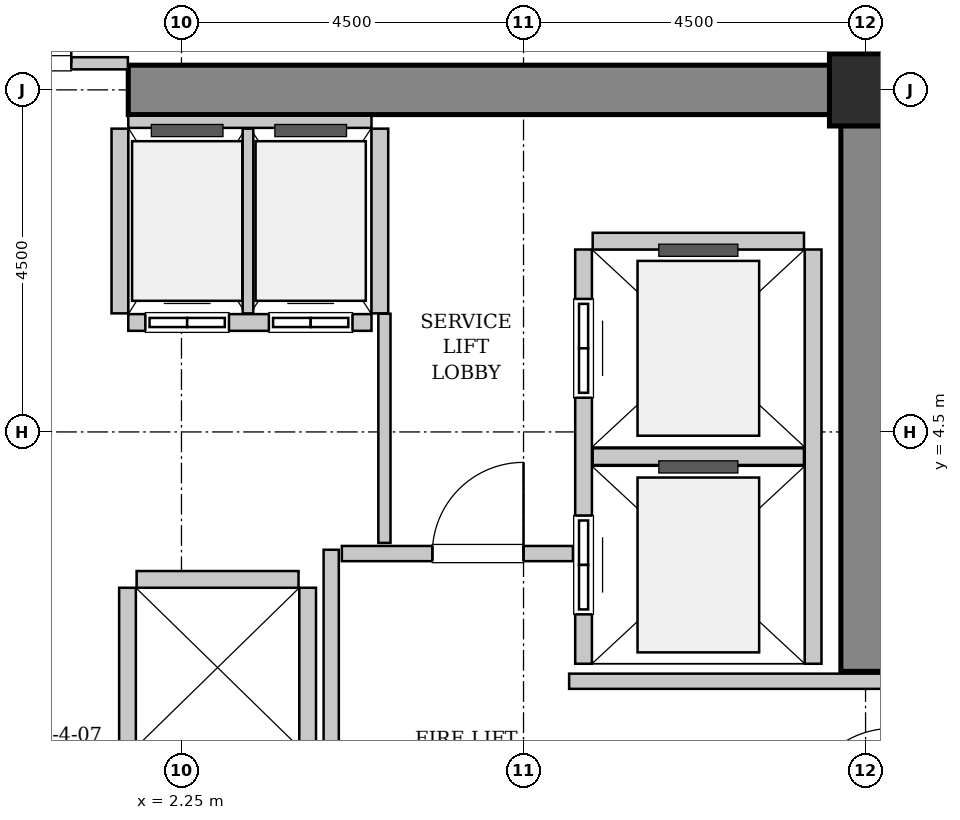
"""IFC4 building model, lengths in metres.
Left out: names, types, materials, properties, quantities, classifications, styles, units other than length and angle.
Written with IfcOpenShell. Run it as: python <this file> out.ifc"""

import sys

from ifc_helpers import new_model, si_unit, direction, frame, frame_2d, origin, origin_2d, place, context, subcontext, project, spatial, rectangle, hollow_rectangle, extrude, source, transform, mapped, element, fill, save


model = new_model("IFC4")
c1 = context("Model", 3, precision=1e-05, world=origin(), true_north=direction((0.0, 1.0)))
c2 = subcontext(c1, "Body", "Model", "MODEL_VIEW")
j1 = project(units=[si_unit("LENGTHUNIT", "METRE"), si_unit("PLANEANGLEUNIT", "RADIAN")], contexts=[c1])
p1 = place(None, origin())
s1 = spatial("IfcSite", under=j1, at=p1, CompositionType="ELEMENT")
p2 = place(p1, origin())
s2 = spatial("IfcBuilding", under=s1, at=p2, CompositionType="ELEMENT")
p3 = place(p2, frame((0.0, 0.0, 44.4)))
s3 = spatial("IfcBuildingStorey", under=s2, at=p3, CompositionType="ELEMENT", Elevation=44.4)
m1 = source(origin(), c2, "Body", "SweptSolid", [
    extrude(rectangle(XDim=10.025, YDim=0.65, at=frame_2d((5.012, 0.0))), origin(), (0.0, 0.0, 1.0), 3.8),
])
p4 = place(p3, frame((1.55, 9.0, 0.0), z_axis=(0.0, 0.0, 1.0), x_axis=(1.0, 0.0, 0.0)))
e1 = element("IfcWall", 1, at=p4, inside=s3, PredefinedType="SHEAR", context=c2, shape_type="MappedRepresentation", body=[
    mapped(m1, transform((0.0, 0.0, 0.0), x_axis=(1.0, 0.0, 0.0), y_axis=(0.0, 1.0, 0.0), z_axis=(0.0, 0.0, 1.0), scale=1.0)),
])
m2 = source(origin(), c2, "Body", "SweptSolid", [
    extrude(rectangle(XDim=7.325, YDim=0.65, at=frame_2d((3.663, 0.0))), origin(), (0.0, 0.0, 1.0), 3.8),
])
p5 = place(p3, frame((11.25, 1.35, 0.0), z_axis=(0.0, 0.0, 1.0), x_axis=(0.0, 1.0, 0.0)))
e2 = element("IfcWall", 2, at=p5, inside=s3, PredefinedType="SHEAR", context=c2, shape_type="MappedRepresentation", body=[
    mapped(m2, transform((0.0, 0.0, 0.0), x_axis=(1.0, 0.0, 0.0), y_axis=(0.0, 1.0, 0.0), z_axis=(0.0, 0.0, 1.0), scale=1.0)),
])
m3 = source(origin(), c2, "Body", "SweptSolid", [
    extrude(hollow_rectangle(XDim=0.95, YDim=0.95, WallThickness=0.045, InnerFilletRadius=0.045, OuterFilletRadius=0.09, at=origin_2d()), origin(), (0.0, 0.0, 1.0), 3.8),
])
p6 = place(p3, frame((11.25, 9.0, 0.0), z_axis=(0.0, 0.0, 1.0), x_axis=(1.0, 0.0, 0.0)))
e3 = element("IfcColumn", 3, at=p6, inside=s3, PredefinedType="COLUMN", context=c2, shape_type="MappedRepresentation", body=[
    mapped(m3, transform((0.0, 0.0, 0.0), x_axis=(1.0, 0.0, 0.0), y_axis=(0.0, 1.0, 0.0), z_axis=(0.0, 0.0, 1.0), scale=1.0)),
])
m4 = source(origin(), c2, "Body", "SweptSolid", [
    extrude(rectangle(XDim=5.45, YDim=0.22, at=frame_2d((2.725, 0.0))), origin(), (0.0, 0.0, 1.0), 3.535),
])
p7 = place(p3, frame((7.54, 6.9, 0.0), z_axis=(0.0, 0.0, 1.0), x_axis=(0.0, -1.0, 0.0)))
e4 = element("IfcWall", 4, at=p7, inside=s3, PredefinedType="SOLIDWALL", context=c2, shape_type="MappedRepresentation", body=[
    mapped(m4, transform((0.0, 0.0, 0.0), x_axis=(1.0, 0.0, 0.0), y_axis=(0.0, 1.0, 0.0), z_axis=(0.0, 0.0, 1.0), scale=1.0)),
])
p8 = place(p7, frame((3.5, 0.0, 0.0)))
e5 = element("IfcOpeningElement", 5, at=p8, cuts=e4, PredefinedType="OPENING", context=c2, shape_type="SweptSolid", body=[
    extrude(rectangle(XDim=1.3, YDim=2.3, at=frame_2d((0.65, 1.15))), frame((0.0, 0.12, 0.0), z_axis=(0.0, -1.0, 0.0), x_axis=(1.0, 0.0, 0.0)), (0.0, 0.0, 1.0), 0.24),
])
p9 = place(p7, frame((0.65, 0.0, 0.0)))
e6 = element("IfcOpeningElement", 6, at=p9, cuts=e4, PredefinedType="OPENING", context=c2, shape_type="SweptSolid", body=[
    extrude(rectangle(XDim=1.3, YDim=2.3, at=frame_2d((0.65, 1.15))), frame((0.0, 0.12, 0.0), z_axis=(0.0, -1.0, 0.0), x_axis=(1.0, 0.0, 0.0)), (0.0, 0.0, 1.0), 0.24),
])
p10 = place(p3, frame((10.56, 1.45, 0.0), z_axis=(0.0, 0.0, 1.0), x_axis=(0.0, 1.0, 0.0)))
e7 = element("IfcWall", 7, at=p10, inside=s3, PredefinedType="SOLIDWALL", context=c2, shape_type="MappedRepresentation", body=[
    mapped(m4, transform((0.0, 0.0, 0.0), x_axis=(1.0, 0.0, 0.0), y_axis=(0.0, 1.0, 0.0), z_axis=(0.0, 0.0, 1.0), scale=1.0)),
])
m5 = source(origin(), c2, "Body", "SweptSolid", [
    extrude(rectangle(XDim=2.78, YDim=0.22, at=frame_2d((1.39, 0.0))), origin(), (0.0, 0.0, 1.0), 3.535),
])
for number, where, z_axis, x_axis in (
    (8, (7.66, 4.175, 0.0), (0.0, 0.0, 1.0), (1.0, 0.0, 0.0)),
    (9, (10.44, 7.01, 0.0), (0.0, 0.0, 1.0), (-1.0, 0.0, 0.0)),
):
    element("IfcWall", number, at=place(p3, frame(where, z_axis=z_axis, x_axis=x_axis)), inside=s3, PredefinedType="SOLIDWALL", context=c2, shape_type="MappedRepresentation", body=[
        mapped(m5, transform((0.0, 0.0, 0.0), x_axis=(1.0, 0.0, 0.0), y_axis=(0.0, 1.0, 0.0), z_axis=(0.0, 0.0, 1.0), scale=1.0)),
    ])
m6 = source(origin(), c2, "Body", "SweptSolid", [
    extrude(rectangle(XDim=3.2, YDim=0.22, at=frame_2d((1.6, 0.0))), origin(), (0.0, 0.0, 1.0), 3.535),
])
p11 = place(p3, frame((1.55, 5.94, 0.0), z_axis=(0.0, 0.0, 1.0), x_axis=(1.0, 0.0, 0.0)))
e10 = element("IfcWall", 10, at=p11, inside=s3, PredefinedType="SOLIDWALL", context=c2, shape_type="MappedRepresentation", body=[
    mapped(m6, transform((0.0, 0.0, 0.0), x_axis=(1.0, 0.0, 0.0), y_axis=(0.0, 1.0, 0.0), z_axis=(0.0, 0.0, 1.0), scale=1.0)),
])
p12 = place(p11, frame((0.225, 0.0, 0.0)))
e11 = element("IfcOpeningElement", 11, at=p12, cuts=e10, PredefinedType="OPENING", context=c2, shape_type="SweptSolid", body=[
    extrude(rectangle(XDim=1.1, YDim=2.2, at=frame_2d((0.55, 1.1))), frame((0.0, 0.12, 0.0), z_axis=(0.0, -1.0, 0.0), x_axis=(1.0, 0.0, 0.0)), (0.0, 0.0, 1.0), 0.24),
])
p13 = place(p11, frame((1.85, 0.0, 0.0)))
e12 = element("IfcOpeningElement", 12, at=p13, cuts=e10, PredefinedType="OPENING", context=c2, shape_type="SweptSolid", body=[
    extrude(rectangle(XDim=1.1, YDim=2.2, at=frame_2d((0.55, 1.1))), frame((0.0, 0.12, 0.0), z_axis=(0.0, -1.0, 0.0), x_axis=(1.0, 0.0, 0.0)), (0.0, 0.0, 1.0), 0.24),
])
m7 = source(origin(), c2, "Body", "SweptSolid", [
    extrude(rectangle(XDim=3.2, YDim=0.16, at=frame_2d((1.6, 0.0))), origin(), (0.0, 0.0, 1.0), 2.425),
])
p14 = place(p3, frame((4.75, 8.58, 0.0), z_axis=(0.0, 0.0, 1.0), x_axis=(-1.0, 0.0, 0.0)))
e13 = element("IfcWall", 13, at=p14, inside=s3, PredefinedType="PARTITIONING", context=c2, shape_type="MappedRepresentation", body=[
    mapped(m7, transform((0.0, 0.0, 0.0), x_axis=(1.0, 0.0, 0.0), y_axis=(0.0, 1.0, 0.0), z_axis=(0.0, 0.0, 1.0), scale=1.0)),
])
m8 = source(origin(), c2, "Body", "SweptSolid", [
    extrude(rectangle(XDim=2.43, YDim=0.22, at=frame_2d((1.215, 0.0))), origin(), (0.0, 0.0, 1.0), 3.535),
])
p15 = place(p3, frame((1.44, 8.49, 0.0), z_axis=(0.0, 0.0, 1.0), x_axis=(0.0, -1.0, 0.0)))
e14 = element("IfcWall", 14, at=p15, inside=s3, PredefinedType="SOLIDWALL", context=c2, shape_type="MappedRepresentation", body=[
    mapped(m8, transform((0.0, 0.0, 0.0), x_axis=(1.0, 0.0, 0.0), y_axis=(0.0, 1.0, 0.0), z_axis=(0.0, 0.0, 1.0), scale=1.0)),
])
m9 = source(origin(), c2, "Body", "SweptSolid", [
    extrude(rectangle(XDim=2.43, YDim=0.14, at=frame_2d((1.215, 0.0))), origin(), (0.0, 0.0, 1.0), 3.535),
])
p16 = place(p3, frame((3.125, 6.06, 0.0), z_axis=(0.0, 0.0, 1.0), x_axis=(0.0, 1.0, 0.0)))
e15 = element("IfcWall", 15, at=p16, inside=s3, PredefinedType="PARTITIONING", context=c2, shape_type="MappedRepresentation", body=[
    mapped(m9, transform((0.0, 0.0, 0.0), x_axis=(1.0, 0.0, 0.0), y_axis=(0.0, 1.0, 0.0), z_axis=(0.0, 0.0, 1.0), scale=1.0)),
])
p17 = place(p3, frame((4.86, 6.06, 0.0), z_axis=(0.0, 0.0, 1.0), x_axis=(0.0, 1.0, 0.0)))
e16 = element("IfcWall", 16, at=p17, inside=s3, PredefinedType="SOLIDWALL", context=c2, shape_type="MappedRepresentation", body=[
    mapped(m8, transform((0.0, 0.0, 0.0), x_axis=(1.0, 0.0, 0.0), y_axis=(0.0, 1.0, 0.0), z_axis=(0.0, 0.0, 1.0), scale=1.0)),
])
m10 = source(origin(), c2, "Body", "SweptSolid", [
    extrude(rectangle(XDim=4.9, YDim=0.22, at=frame_2d((2.45, 0.0))), origin(), (0.0, 0.0, 1.0), 3.535),
])
for number, where, z_axis, x_axis in (
    (17, (1.54, 2.45, 0.0), (0.0, 0.0, 1.0), (0.0, -1.0, 0.0)),
    (18, (3.91, -2.45, 0.0), (0.0, 0.0, 1.0), (0.0, 1.0, 0.0)),
):
    element("IfcWall", number, at=place(p3, frame(where, z_axis=z_axis, x_axis=x_axis)), inside=s3, PredefinedType="SOLIDWALL", context=c2, shape_type="MappedRepresentation", body=[
        mapped(m10, transform((0.0, 0.0, 0.0), x_axis=(1.0, 0.0, 0.0), y_axis=(0.0, 1.0, 0.0), z_axis=(0.0, 0.0, 1.0), scale=1.0)),
    ])
m11 = source(origin(), c2, "Body", "SweptSolid", [
    extrude(rectangle(XDim=2.13, YDim=0.22, at=frame_2d((1.065, 0.0))), origin(), (0.0, 0.0, 1.0), 3.535),
])
p18 = place(p3, frame((3.79, 2.56, 0.0), z_axis=(0.0, 0.0, 1.0), x_axis=(-1.0, 0.0, 0.0)))
e19 = element("IfcWall", 19, at=p18, inside=s3, PredefinedType="SOLIDWALL", context=c2, shape_type="MappedRepresentation", body=[
    mapped(m11, transform((0.0, 0.0, 0.0), x_axis=(1.0, 0.0, 0.0), y_axis=(0.0, 1.0, 0.0), z_axis=(0.0, 0.0, 1.0), scale=1.0)),
])
m12 = source(origin(), c2, "Body", "SweptSolid", [
    extrude(rectangle(XDim=5.9, YDim=0.2, at=frame_2d((2.95, 0.0))), origin(), (0.0, 0.0, 1.0), 3.535),
])
p19 = place(p3, frame((4.22, -2.95, 0.0), z_axis=(0.0, 0.0, 1.0), x_axis=(0.0, 1.0, 0.0)))
e20 = element("IfcWall", 20, at=p19, inside=s3, PredefinedType="PARTITIONING", context=c2, shape_type="MappedRepresentation", body=[
    mapped(m12, transform((0.0, 0.0, 0.0), x_axis=(1.0, 0.0, 0.0), y_axis=(0.0, 1.0, 0.0), z_axis=(0.0, 0.0, 1.0), scale=1.0)),
])
m13 = source(origin(), c2, "Body", "SweptSolid", [
    extrude(rectangle(XDim=3.04, YDim=0.2, at=frame_2d((1.52, 0.0))), origin(), (0.0, 0.0, 1.0), 3.535),
])
p20 = place(p3, frame((4.36, 2.9, 0.0), z_axis=(0.0, 0.0, 1.0), x_axis=(1.0, 0.0, 0.0)))
e21 = element("IfcWall", 21, at=p20, inside=s3, PredefinedType="PARTITIONING", context=c2, shape_type="MappedRepresentation", body=[
    mapped(m13, transform((0.0, 0.0, 0.0), x_axis=(1.0, 0.0, 0.0), y_axis=(0.0, 1.0, 0.0), z_axis=(0.0, 0.0, 1.0), scale=1.0)),
])
p21 = place(p20, frame((1.19, 0.0, 0.0)))
e22 = element("IfcOpeningElement", 22, at=p21, cuts=e21, PredefinedType="OPENING", context=c2, shape_type="SweptSolid", body=[
    extrude(rectangle(XDim=1.2, YDim=2.15, at=frame_2d((0.6, 1.075))), frame((0.0, 0.11, 0.0), z_axis=(0.0, -1.0, 0.0), x_axis=(1.0, 0.0, 0.0)), (0.0, 0.0, 1.0), 0.22),
])
m14 = source(origin(), c2, "Body", "SweptSolid", [
    extrude(rectangle(XDim=4.11, YDim=0.2, at=frame_2d((2.055, 0.0))), origin(), (0.0, 0.0, 1.0), 3.535),
])
p22 = place(p3, frame((7.35, 1.22, 0.0), z_axis=(0.0, 0.0, 1.0), x_axis=(1.0, 0.0, 0.0)))
e23 = element("IfcWall", 23, at=p22, inside=s3, PredefinedType="PARTITIONING", context=c2, shape_type="MappedRepresentation", body=[
    mapped(m14, transform((0.0, 0.0, 0.0), x_axis=(1.0, 0.0, 0.0), y_axis=(0.0, 1.0, 0.0), z_axis=(0.0, 0.0, 1.0), scale=1.0)),
])
m15 = source(origin(), c2, "Body", "SweptSolid", [
    extrude(rectangle(XDim=3.09, YDim=0.16, at=frame_2d((1.545, 0.0))), origin(), (0.0, 0.0, 1.0), 2.425),
])
p23 = place(p3, frame((-1.545, 9.35, 0.0), z_axis=(0.0, 0.0, 1.0), x_axis=(1.0, 0.0, 0.0)))
e24 = element("IfcWall", 24, at=p23, inside=s3, PredefinedType="PARTITIONING", context=c2, shape_type="MappedRepresentation", body=[
    mapped(m15, transform((0.0, 0.0, 0.0), x_axis=(1.0, 0.0, 0.0), y_axis=(0.0, 1.0, 0.0), z_axis=(0.0, 0.0, 1.0), scale=1.0)),
])
p24 = place(p23, frame((0.745, 0.0, 0.0)))
e25 = element("IfcOpeningElement", 25, at=p24, cuts=e24, PredefinedType="OPENING", context=c2, shape_type="SweptSolid", body=[
    extrude(rectangle(XDim=1.6, YDim=2.3, at=frame_2d((0.8, 1.15))), frame((0.0, 0.09, 0.0), z_axis=(0.0, -1.0, 0.0), x_axis=(1.0, 0.0, 0.0)), (0.0, 0.0, 1.0), 0.18),
])
m16 = source(origin(), c2, "Body", "SweptSolid", [
    extrude(rectangle(XDim=3.015, YDim=0.16, at=frame_2d((1.507, 0.0))), origin(), (0.0, 0.0, 1.0), 3.535),
])
p25 = place(p3, frame((4.92, 3.04, 0.0), z_axis=(0.0, 0.0, 1.0), x_axis=(0.0, 1.0, 0.0)))
e26 = element("IfcWall", 26, at=p25, inside=s3, PredefinedType="PARTITIONING", context=c2, shape_type="MappedRepresentation", body=[
    mapped(m16, transform((0.0, 0.0, 0.0), x_axis=(1.0, 0.0, 0.0), y_axis=(0.0, 1.0, 0.0), z_axis=(0.0, 0.0, 1.0), scale=1.0)),
])
m17 = source(origin(), c2, "Body", "SweptSolid", [
    extrude(rectangle(XDim=1.3, YDim=2.3, at=frame_2d((0.65, 1.15))), frame((0.0, 0.025, 0.0), z_axis=(0.0, -1.0, 0.0), x_axis=(1.0, 0.0, 0.0)), (0.0, 0.0, 1.0), 0.05),
])
p26 = place(p8, origin())
e27 = element("IfcDoor", 27, at=p26, inside=s3, OperationType="SLIDING_TO_RIGHT", PredefinedType="DOOR", context=c2, shape_type="MappedRepresentation", body=[
    mapped(m17, transform((0.0, 0.0, 0.0), x_axis=(1.0, 0.0, 0.0), y_axis=(0.0, 1.0, 0.0), z_axis=(0.0, 0.0, 1.0), scale=1.0)),
])
fill(e5, e27)
p27 = place(p9, origin())
e28 = element("IfcDoor", 28, at=p27, inside=s3, OperationType="SLIDING_TO_RIGHT", PredefinedType="DOOR", context=c2, shape_type="MappedRepresentation", body=[
    mapped(m17, transform((0.0, 0.0, 0.0), x_axis=(1.0, 0.0, 0.0), y_axis=(0.0, 1.0, 0.0), z_axis=(0.0, 0.0, 1.0), scale=1.0)),
])
fill(e6, e28)
m18 = source(origin(), c2, "Body", "SweptSolid", [
    extrude(rectangle(XDim=1.1, YDim=2.2, at=frame_2d((0.55, 1.1))), frame((0.0, 0.025, 0.0), z_axis=(0.0, -1.0, 0.0), x_axis=(1.0, 0.0, 0.0)), (0.0, 0.0, 1.0), 0.05),
])
p28 = place(p12, origin())
e29 = element("IfcDoor", 29, at=p28, inside=s3, OperationType="DOUBLE_DOOR_SLIDING", PredefinedType="DOOR", context=c2, shape_type="MappedRepresentation", body=[
    mapped(m18, transform((0.0, 0.0, 0.0), x_axis=(1.0, 0.0, 0.0), y_axis=(0.0, 1.0, 0.0), z_axis=(0.0, 0.0, 1.0), scale=1.0)),
])
fill(e11, e29)
p29 = place(p13, origin())
e30 = element("IfcDoor", 30, at=p29, inside=s3, OperationType="DOUBLE_DOOR_SLIDING", PredefinedType="DOOR", context=c2, shape_type="MappedRepresentation", body=[
    mapped(m18, transform((0.0, 0.0, 0.0), x_axis=(1.0, 0.0, 0.0), y_axis=(0.0, 1.0, 0.0), z_axis=(0.0, 0.0, 1.0), scale=1.0)),
])
fill(e12, e30)
m19 = source(origin(), c2, "Body", "SweptSolid", [
    extrude(rectangle(XDim=1.2, YDim=2.15, at=frame_2d((0.6, 1.075))), frame((0.0, 0.025, 0.0), z_axis=(0.0, -1.0, 0.0), x_axis=(1.0, 0.0, 0.0)), (0.0, 0.0, 1.0), 0.05),
])
p30 = place(p21, origin())
e31 = element("IfcDoor", 31, at=p30, inside=s3, OperationType="SINGLE_SWING_RIGHT", PredefinedType="DOOR", context=c2, shape_type="MappedRepresentation", body=[
    mapped(m19, transform((0.0, 0.0, 0.0), x_axis=(1.0, 0.0, 0.0), y_axis=(0.0, 1.0, 0.0), z_axis=(0.0, 0.0, 1.0), scale=1.0)),
])
fill(e22, e31)
m20 = source(origin(), c2, "Body", "SweptSolid", [
    extrude(rectangle(XDim=1.6, YDim=2.3, at=frame_2d((0.8, 1.15))), frame((0.0, 0.025, 0.0), z_axis=(0.0, -1.0, 0.0), x_axis=(1.0, 0.0, 0.0)), (0.0, 0.0, 1.0), 0.05),
])
p31 = place(p24, origin())
e32 = element("IfcDoor", 32, at=p31, inside=s3, OperationType="DOUBLE_DOOR_SINGLE_SWING", PredefinedType="DOOR", context=c2, shape_type="MappedRepresentation", body=[
    mapped(m20, transform((0.0, 0.0, 0.0), x_axis=(1.0, 0.0, 0.0), y_axis=(0.0, 1.0, 0.0), z_axis=(0.0, 0.0, 1.0), scale=1.0)),
])
fill(e25, e32)
save(model, sys.argv[1])
